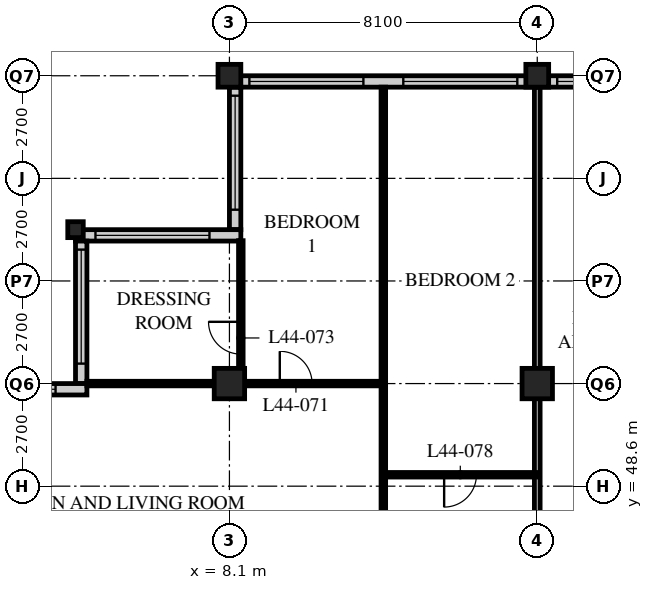
"""IFC4 building model, lengths in metres.
Left out: names, types, materials, properties, quantities, classifications, styles, units other than length and angle.
Written with IfcOpenShell. Run it as: python <this file> out.ifc"""

import sys

from ifc_helpers import new_model, si_unit, direction, frame, frame_2d, origin, origin_2d, place, context, subcontext, project, spatial, rectangle, hollow_rectangle, i_section, extrude, element, fill, save


model = new_model("IFC4")
c1 = context("Model", 3, precision=1e-05, world=origin(), true_north=direction((0.0, 1.0)))
c2 = subcontext(c1, "Body", "Model", "MODEL_VIEW")
j1 = project(units=[si_unit("LENGTHUNIT", "METRE"), si_unit("PLANEANGLEUNIT", "RADIAN")], contexts=[c1])
p1 = place(None, origin())
s1 = spatial("IfcSite", under=j1, at=p1, CompositionType="ELEMENT")
p2 = place(p1, origin())
s2 = spatial("IfcBuilding", under=s1, at=p2, CompositionType="ELEMENT")
p3 = place(p2, frame((0.0, 0.0, 174.0)))
s3 = spatial("IfcBuildingStorey", under=s2, at=p3, CompositionType="ELEMENT", Elevation=174.0)
p4 = place(p3, frame((4.05, 55.35, 0.0), z_axis=(0.0, 0.0, 1.0), x_axis=(1.0, 0.0, 0.0)))
e1 = element("IfcColumn", 1, at=p4, inside=s3, PredefinedType="COLUMN", context=c2, shape_type="SweptSolid", body=[
    extrude(i_section(OverallWidth=0.407, OverallDepth=0.419, WebThickness=0.031, FlangeThickness=0.049, FilletRadius=0.015, at=origin_2d()), origin(), (0.0, 0.0, 1.0), 3.6),
])
p5 = place(p3, frame((8.1, 51.3, 0.0), z_axis=(0.0, 0.0, 1.0), x_axis=(1.0, 0.0, 0.0)))
e2 = element("IfcColumn", 2, at=p5, inside=s3, PredefinedType="COLUMN", context=c2, shape_type="SweptSolid", body=[
    extrude(hollow_rectangle(XDim=0.8, YDim=0.8, WallThickness=0.08, at=origin_2d()), origin(), (0.0, 0.0, 1.0), 3.6),
])
p6 = place(p3, frame((8.1, 59.4, 0.0), z_axis=(0.0, 0.0, 1.0), x_axis=(1.0, 0.0, 0.0)))
e3 = element("IfcColumn", 3, at=p6, inside=s3, PredefinedType="COLUMN", context=c2, shape_type="SweptSolid", body=[
    extrude(hollow_rectangle(XDim=0.6, YDim=0.6, WallThickness=0.05, at=origin_2d()), origin(), (0.0, 0.0, 1.0), 3.6),
])
p7 = place(p3, frame((16.2, 51.3, 0.0), z_axis=(0.0, 0.0, 1.0), x_axis=(1.0, 0.0, 0.0)))
e4 = element("IfcColumn", 4, at=p7, inside=s3, PredefinedType="COLUMN", context=c2, shape_type="SweptSolid", body=[
    extrude(hollow_rectangle(XDim=0.8, YDim=0.8, WallThickness=0.08, at=origin_2d()), origin(), (0.0, 0.0, 1.0), 3.6),
])
p8 = place(p3, frame((16.2, 59.4, 0.0), z_axis=(0.0, 0.0, 1.0), x_axis=(1.0, 0.0, 0.0)))
e5 = element("IfcColumn", 5, at=p8, inside=s3, PredefinedType="COLUMN", context=c2, shape_type="SweptSolid", body=[
    extrude(hollow_rectangle(XDim=0.6, YDim=0.6, WallThickness=0.05, at=origin_2d()), origin(), (0.0, 0.0, 1.0), 3.6),
])
p9 = place(p3, frame((48.3, 59.25, 0.0), z_axis=(0.0, 0.0, 1.0), x_axis=(-1.0, 0.0, 0.0)))
e6 = element("IfcWall", 6, at=p9, inside=s3, PredefinedType="SOLIDWALL", context=c2, shape_type="SweptSolid", body=[
    extrude(rectangle(XDim=40.2, YDim=0.3, at=frame_2d((20.1, 0.0))), origin(), (0.0, 0.0, 1.0), 3.39),
])
p10 = place(p9, frame((0.225, 0.0, 0.6)))
e7 = element("IfcOpeningElement", 7, at=p10, cuts=e6, PredefinedType="OPENING", context=c2, shape_type="SweptSolid", body=[
    extrude(rectangle(XDim=3.0, YDim=2.4, at=frame_2d((1.5, 1.2))), frame((0.0, 0.16, 0.0), z_axis=(0.0, -1.0, 0.0), x_axis=(1.0, 0.0, 0.0)), (0.0, 0.0, 1.0), 0.32),
])
p11 = place(p9, frame((4.275, 0.0, 0.6)))
e8 = element("IfcOpeningElement", 8, at=p11, cuts=e6, PredefinedType="OPENING", context=c2, shape_type="SweptSolid", body=[
    extrude(rectangle(XDim=3.0, YDim=2.4, at=frame_2d((1.5, 1.2))), frame((0.0, 0.16, 0.0), z_axis=(0.0, -1.0, 0.0), x_axis=(1.0, 0.0, 0.0)), (0.0, 0.0, 1.0), 0.32),
])
p12 = place(p9, frame((8.325, 0.0, 0.6)))
e9 = element("IfcOpeningElement", 9, at=p12, cuts=e6, PredefinedType="OPENING", context=c2, shape_type="SweptSolid", body=[
    extrude(rectangle(XDim=3.0, YDim=2.4, at=frame_2d((1.5, 1.2))), frame((0.0, 0.16, 0.0), z_axis=(0.0, -1.0, 0.0), x_axis=(1.0, 0.0, 0.0)), (0.0, 0.0, 1.0), 0.32),
])
p13 = place(p9, frame((12.375, 0.0, 0.6)))
e10 = element("IfcOpeningElement", 10, at=p13, cuts=e6, PredefinedType="OPENING", context=c2, shape_type="SweptSolid", body=[
    extrude(rectangle(XDim=3.0, YDim=2.4, at=frame_2d((1.5, 1.2))), frame((0.0, 0.16, 0.0), z_axis=(0.0, -1.0, 0.0), x_axis=(1.0, 0.0, 0.0)), (0.0, 0.0, 1.0), 0.32),
])
p14 = place(p9, frame((16.425, 0.0, 0.6)))
e11 = element("IfcOpeningElement", 11, at=p14, cuts=e6, PredefinedType="OPENING", context=c2, shape_type="SweptSolid", body=[
    extrude(rectangle(XDim=3.0, YDim=2.4, at=frame_2d((1.5, 1.2))), frame((0.0, 0.16, 0.0), z_axis=(0.0, -1.0, 0.0), x_axis=(1.0, 0.0, 0.0)), (0.0, 0.0, 1.0), 0.32),
])
p15 = place(p9, frame((20.475, 0.0, 0.6)))
e12 = element("IfcOpeningElement", 12, at=p15, cuts=e6, PredefinedType="OPENING", context=c2, shape_type="SweptSolid", body=[
    extrude(rectangle(XDim=3.0, YDim=2.4, at=frame_2d((1.5, 1.2))), frame((0.0, 0.16, 0.0), z_axis=(0.0, -1.0, 0.0), x_axis=(1.0, 0.0, 0.0)), (0.0, 0.0, 1.0), 0.32),
])
p16 = place(p9, frame((24.525, 0.0, 0.6)))
e13 = element("IfcOpeningElement", 13, at=p16, cuts=e6, PredefinedType="OPENING", context=c2, shape_type="SweptSolid", body=[
    extrude(rectangle(XDim=3.0, YDim=2.4, at=frame_2d((1.5, 1.2))), frame((0.0, 0.16, 0.0), z_axis=(0.0, -1.0, 0.0), x_axis=(1.0, 0.0, 0.0)), (0.0, 0.0, 1.0), 0.32),
])
p17 = place(p9, frame((28.575, 0.0, 0.6)))
e14 = element("IfcOpeningElement", 14, at=p17, cuts=e6, PredefinedType="OPENING", context=c2, shape_type="SweptSolid", body=[
    extrude(rectangle(XDim=3.0, YDim=2.4, at=frame_2d((1.5, 1.2))), frame((0.0, 0.16, 0.0), z_axis=(0.0, -1.0, 0.0), x_axis=(1.0, 0.0, 0.0)), (0.0, 0.0, 1.0), 0.32),
])
p18 = place(p9, frame((32.625, 0.0, 0.6)))
e15 = element("IfcOpeningElement", 15, at=p18, cuts=e6, PredefinedType="OPENING", context=c2, shape_type="SweptSolid", body=[
    extrude(rectangle(XDim=3.0, YDim=2.4, at=frame_2d((1.5, 1.2))), frame((0.0, 0.16, 0.0), z_axis=(0.0, -1.0, 0.0), x_axis=(1.0, 0.0, 0.0)), (0.0, 0.0, 1.0), 0.32),
])
p19 = place(p9, frame((36.675, 0.0, 0.6)))
e16 = element("IfcOpeningElement", 16, at=p19, cuts=e6, PredefinedType="OPENING", context=c2, shape_type="SweptSolid", body=[
    extrude(rectangle(XDim=3.0, YDim=2.4, at=frame_2d((1.5, 1.2))), frame((0.0, 0.16, 0.0), z_axis=(0.0, -1.0, 0.0), x_axis=(1.0, 0.0, 0.0)), (0.0, 0.0, 1.0), 0.32),
])
p20 = place(p3, frame((8.25, 59.1, 0.0), z_axis=(0.0, 0.0, 1.0), x_axis=(0.0, -1.0, 0.0)))
e17 = element("IfcWall", 17, at=p20, inside=s3, PredefinedType="SOLIDWALL", context=c2, shape_type="SweptSolid", body=[
    extrude(rectangle(XDim=3.75, YDim=0.3, at=frame_2d((1.875, 0.0))), origin(), (0.0, 0.0, 1.0), 3.39),
])
p21 = place(p20, frame((0.225, 0.0, 0.6)))
e18 = element("IfcOpeningElement", 18, at=p21, cuts=e17, PredefinedType="OPENING", context=c2, shape_type="SweptSolid", body=[
    extrude(rectangle(XDim=3.0, YDim=2.0, at=frame_2d((1.5, 1.0))), frame((0.0, 0.16, 0.0), z_axis=(0.0, -1.0, 0.0), x_axis=(1.0, 0.0, 0.0)), (0.0, 0.0, 1.0), 0.32),
])
p22 = place(p3, frame((8.4, 55.2, 0.0), z_axis=(0.0, 0.0, 1.0), x_axis=(-1.0, 0.0, 0.0)))
e19 = element("IfcWall", 19, at=p22, inside=s3, PredefinedType="SOLIDWALL", context=c2, shape_type="SweptSolid", body=[
    extrude(rectangle(XDim=4.35, YDim=0.3, at=frame_2d((2.175, 0.0))), origin(), (0.0, 0.0, 1.0), 3.39),
])
p23 = place(p22, frame((0.825, 0.0, 0.6)))
e20 = element("IfcOpeningElement", 20, at=p23, cuts=e19, PredefinedType="OPENING", context=c2, shape_type="SweptSolid", body=[
    extrude(rectangle(XDim=3.0, YDim=2.0, at=frame_2d((1.5, 1.0))), frame((0.0, 0.16, 0.0), z_axis=(0.0, -1.0, 0.0), x_axis=(1.0, 0.0, 0.0)), (0.0, 0.0, 1.0), 0.32),
])
p24 = place(p3, frame((4.2, 55.05, 0.0), z_axis=(0.0, 0.0, 1.0), x_axis=(0.0, -1.0, 0.0)))
e21 = element("IfcWall", 21, at=p24, inside=s3, PredefinedType="SOLIDWALL", context=c2, shape_type="SweptSolid", body=[
    extrude(rectangle(XDim=3.75, YDim=0.3, at=frame_2d((1.875, 0.0))), origin(), (0.0, 0.0, 1.0), 3.39),
])
p25 = place(p24, frame((0.225, 0.0, 0.6)))
e22 = element("IfcOpeningElement", 22, at=p25, cuts=e21, PredefinedType="OPENING", context=c2, shape_type="SweptSolid", body=[
    extrude(rectangle(XDim=3.0, YDim=2.0, at=frame_2d((1.5, 1.0))), frame((0.0, 0.16, 0.0), z_axis=(0.0, -1.0, 0.0), x_axis=(1.0, 0.0, 0.0)), (0.0, 0.0, 1.0), 0.32),
])
p26 = place(p3, frame((4.35, 51.15, 0.0), z_axis=(0.0, 0.0, 1.0), x_axis=(-1.0, 0.0, 0.0)))
e23 = element("IfcWall", 23, at=p26, inside=s3, PredefinedType="SOLIDWALL", context=c2, shape_type="SweptSolid", body=[
    extrude(rectangle(XDim=4.35, YDim=0.3, at=frame_2d((2.175, 0.0))), origin(), (0.0, 0.0, 1.0), 3.39),
])
p27 = place(p26, frame((0.825, 0.0, 0.6)))
e24 = element("IfcOpeningElement", 24, at=p27, cuts=e23, PredefinedType="OPENING", context=c2, shape_type="SweptSolid", body=[
    extrude(rectangle(XDim=3.0, YDim=2.0, at=frame_2d((1.5, 1.0))), frame((0.0, 0.16, 0.0), z_axis=(0.0, -1.0, 0.0), x_axis=(1.0, 0.0, 0.0)), (0.0, 0.0, 1.0), 0.32),
])
p28 = place(p3, frame((12.15, 45.6, 0.0), z_axis=(0.0, 0.0, 1.0), x_axis=(0.0, 1.0, 0.0)))
e25 = element("IfcWall", 25, at=p28, inside=s3, PredefinedType="PARTITIONING", context=c2, shape_type="SweptSolid", body=[
    extrude(rectangle(XDim=13.5, YDim=0.12, at=frame_2d((6.75, 0.0))), origin(), (0.0, 0.0, 1.0), 3.39),
])
p29 = place(p3, frame((12.15, 51.3, 0.0), z_axis=(0.0, 0.0, 1.0), x_axis=(-1.0, 0.0, 0.0)))
e26 = element("IfcWall", 26, at=p29, inside=s3, PredefinedType="PARTITIONING", context=c2, shape_type="SweptSolid", body=[
    extrude(rectangle(XDim=7.8, YDim=0.12, at=frame_2d((3.9, 0.0))), origin(), (0.0, 0.0, 1.0), 2.778),
])
p30 = place(p29, frame((1.875, 0.0, 0.0)))
e27 = element("IfcOpeningElement", 27, at=p30, cuts=e26, PredefinedType="OPENING", context=c2, shape_type="SweptSolid", body=[
    extrude(rectangle(XDim=0.85, YDim=2.1, at=frame_2d((0.425, 1.05))), frame((0.0, 0.07, 0.0), z_axis=(0.0, -1.0, 0.0), x_axis=(1.0, 0.0, 0.0)), (0.0, 0.0, 1.0), 0.14),
])
p31 = place(p3, frame((16.2, 43.2, 0.0), z_axis=(0.0, 0.0, 1.0), x_axis=(0.0, 1.0, 0.0)))
e28 = element("IfcWall", 28, at=p31, inside=s3, PredefinedType="PARTITIONING", context=c2, shape_type="SweptSolid", body=[
    extrude(rectangle(XDim=15.9, YDim=0.15, at=frame_2d((7.95, 0.0))), origin(), (0.0, 0.0, 1.0), 2.778),
])
p32 = place(p3, frame((8.4, 55.06, 0.0), z_axis=(0.0, 0.0, 1.0), x_axis=(0.0, -1.0, 0.0)))
e29 = element("IfcWall", 29, at=p32, inside=s3, PredefinedType="PARTITIONING", context=c2, shape_type="SweptSolid", body=[
    extrude(rectangle(XDim=3.76, YDim=0.12, at=frame_2d((1.88, 0.0))), origin(), (0.0, 0.0, 1.0), 3.39),
])
p33 = place(p32, frame((2.135, 0.0, 0.0)))
e30 = element("IfcOpeningElement", 30, at=p33, cuts=e29, PredefinedType="OPENING", context=c2, shape_type="SweptSolid", body=[
    extrude(rectangle(XDim=0.85, YDim=2.1, at=frame_2d((0.425, 1.05))), frame((0.0, 0.07, 0.0), z_axis=(0.0, -1.0, 0.0), x_axis=(1.0, 0.0, 0.0)), (0.0, 0.0, 1.0), 0.14),
])
p34 = place(p3, frame((12.15, 48.9, 0.0), z_axis=(0.0, 0.0, 1.0), x_axis=(1.0, 0.0, 0.0)))
e31 = element("IfcWall", 31, at=p34, inside=s3, PredefinedType="PARTITIONING", context=c2, shape_type="SweptSolid", body=[
    extrude(rectangle(XDim=4.05, YDim=0.12, at=frame_2d((2.025, 0.0))), origin(), (0.0, 0.0, 1.0), 3.39),
])
p35 = place(p34, frame((1.6, 0.0, 0.0)))
e32 = element("IfcOpeningElement", 32, at=p35, cuts=e31, PredefinedType="OPENING", context=c2, shape_type="SweptSolid", body=[
    extrude(rectangle(XDim=0.85, YDim=2.1, at=frame_2d((0.425, 1.05))), frame((0.0, 0.07, 0.0), z_axis=(0.0, -1.0, 0.0), x_axis=(1.0, 0.0, 0.0)), (0.0, 0.0, 1.0), 0.14),
])
p36 = place(p17, origin())
e33 = element("IfcWindow", 33, at=p36, inside=s3, PartitioningType="SINGLE_PANEL", PredefinedType="WINDOW", context=c2, shape_type="SweptSolid", body=[
    extrude(rectangle(XDim=3.0, YDim=2.4, at=frame_2d((1.5, 1.2))), frame((0.0, 0.03, 0.0), z_axis=(0.0, -1.0, 0.0), x_axis=(1.0, 0.0, 0.0)), (0.0, 0.0, 1.0), 0.06),
])
fill(e14, e33)
p37 = place(p18, origin())
e34 = element("IfcWindow", 34, at=p37, inside=s3, PartitioningType="SINGLE_PANEL", PredefinedType="WINDOW", context=c2, shape_type="SweptSolid", body=[
    extrude(rectangle(XDim=3.0, YDim=2.4, at=frame_2d((1.5, 1.2))), frame((0.0, 0.03, 0.0), z_axis=(0.0, -1.0, 0.0), x_axis=(1.0, 0.0, 0.0)), (0.0, 0.0, 1.0), 0.06),
])
fill(e15, e34)
p38 = place(p19, origin())
e35 = element("IfcWindow", 35, at=p38, inside=s3, PartitioningType="SINGLE_PANEL", PredefinedType="WINDOW", context=c2, shape_type="SweptSolid", body=[
    extrude(rectangle(XDim=3.0, YDim=2.4, at=frame_2d((1.5, 1.2))), frame((0.0, 0.03, 0.0), z_axis=(0.0, -1.0, 0.0), x_axis=(1.0, 0.0, 0.0)), (0.0, 0.0, 1.0), 0.06),
])
fill(e16, e35)
p39 = place(p21, origin())
e36 = element("IfcWindow", 36, at=p39, inside=s3, PartitioningType="SINGLE_PANEL", PredefinedType="WINDOW", context=c2, shape_type="SweptSolid", body=[
    extrude(rectangle(XDim=3.0, YDim=2.0, at=frame_2d((1.5, 1.0))), frame((0.0, 0.03, 0.0), z_axis=(0.0, -1.0, 0.0), x_axis=(1.0, 0.0, 0.0)), (0.0, 0.0, 1.0), 0.06),
])
fill(e18, e36)
p40 = place(p23, origin())
e37 = element("IfcWindow", 37, at=p40, inside=s3, PartitioningType="SINGLE_PANEL", PredefinedType="WINDOW", context=c2, shape_type="SweptSolid", body=[
    extrude(rectangle(XDim=3.0, YDim=2.0, at=frame_2d((1.5, 1.0))), frame((0.0, 0.03, 0.0), z_axis=(0.0, -1.0, 0.0), x_axis=(1.0, 0.0, 0.0)), (0.0, 0.0, 1.0), 0.06),
])
fill(e20, e37)
p41 = place(p25, origin())
e38 = element("IfcWindow", 38, at=p41, inside=s3, PartitioningType="SINGLE_PANEL", PredefinedType="WINDOW", context=c2, shape_type="SweptSolid", body=[
    extrude(rectangle(XDim=3.0, YDim=2.0, at=frame_2d((1.5, 1.0))), frame((0.0, 0.03, 0.0), z_axis=(0.0, -1.0, 0.0), x_axis=(1.0, 0.0, 0.0)), (0.0, 0.0, 1.0), 0.06),
])
fill(e22, e38)
p42 = place(p27, origin())
e39 = element("IfcWindow", 39, at=p42, inside=s3, PartitioningType="SINGLE_PANEL", PredefinedType="WINDOW", context=c2, shape_type="SweptSolid", body=[
    extrude(rectangle(XDim=3.0, YDim=2.0, at=frame_2d((1.5, 1.0))), frame((0.0, 0.03, 0.0), z_axis=(0.0, -1.0, 0.0), x_axis=(1.0, 0.0, 0.0)), (0.0, 0.0, 1.0), 0.06),
])
fill(e24, e39)
p43 = place(p30, origin())
e40 = element("IfcDoor", 40, at=p43, inside=s3, OperationType="SINGLE_SWING_LEFT", PredefinedType="DOOR", context=c2, shape_type="SweptSolid", body=[
    extrude(rectangle(XDim=0.85, YDim=2.1, at=frame_2d((0.425, 1.05))), frame((0.0, 0.025, 0.0), z_axis=(0.0, -1.0, 0.0), x_axis=(1.0, 0.0, 0.0)), (0.0, 0.0, 1.0), 0.05),
])
fill(e27, e40)
p44 = place(p33, origin())
e41 = element("IfcDoor", 41, at=p44, inside=s3, OperationType="SINGLE_SWING_RIGHT", PredefinedType="DOOR", context=c2, shape_type="SweptSolid", body=[
    extrude(rectangle(XDim=0.85, YDim=2.1, at=frame_2d((0.425, 1.05))), frame((0.0, 0.025, 0.0), z_axis=(0.0, -1.0, 0.0), x_axis=(1.0, 0.0, 0.0)), (0.0, 0.0, 1.0), 0.05),
])
fill(e30, e41)
p45 = place(p35, origin())
e42 = element("IfcDoor", 42, at=p45, inside=s3, OperationType="SINGLE_SWING_RIGHT", PredefinedType="DOOR", context=c2, shape_type="SweptSolid", body=[
    extrude(rectangle(XDim=0.85, YDim=2.1, at=frame_2d((0.425, 1.05))), frame((0.0, 0.025, 0.0), z_axis=(0.0, -1.0, 0.0), x_axis=(1.0, 0.0, 0.0)), (0.0, 0.0, 1.0), 0.05),
])
fill(e32, e42)
save(model, sys.argv[1])
